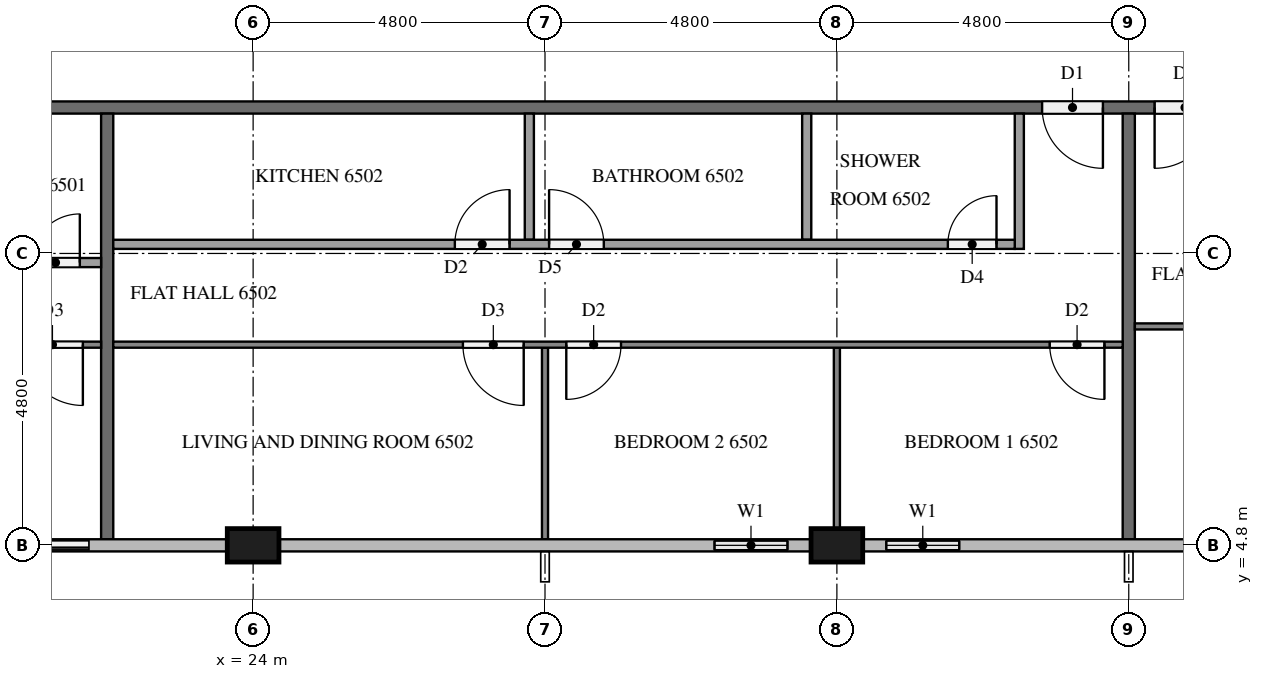
"""IFC4 building model, lengths in metres.
Left out: names, types, materials, properties, quantities, classifications, styles, units other than length and angle.
Written with IfcOpenShell. Run it as: python <this file> out.ifc"""

import sys

from ifc_helpers import new_model, si_unit, direction, frame, frame_2d, origin, origin_2d, place, context, subcontext, project, spatial, rectangle, extrude, element, fill, save


model = new_model("IFC4")
c1 = context("Model", 3, precision=1e-05, world=origin(), true_north=direction((0.0, 1.0)))
c2 = subcontext(c1, "Body", "Model", "MODEL_VIEW")
j1 = project(units=[si_unit("LENGTHUNIT", "METRE"), si_unit("PLANEANGLEUNIT", "RADIAN")], contexts=[c1])
p1 = place(None, origin())
s1 = spatial("IfcSite", under=j1, at=p1, CompositionType="ELEMENT")
p2 = place(p1, origin())
s2 = spatial("IfcBuilding", under=s1, at=p2, CompositionType="ELEMENT")
p3 = place(p2, frame((0.0, 0.0, 249.2)))
s3 = spatial("IfcBuildingStorey", under=s2, at=p3, CompositionType="ELEMENT", Elevation=249.2)
for number, where, z_axis, x_axis in (
    (1, (24.0, 4.8, 0.0), (0.0, 0.0, 1.0), (1.0, 0.0, 0.0)),
    (2, (33.6, 4.8, 0.0), (0.0, 0.0, 1.0), (1.0, 0.0, 0.0)),
):
    element("IfcColumn", number, at=place(p3, frame(where, z_axis=z_axis, x_axis=x_axis)), inside=s3, PredefinedType="COLUMN", context=c2, shape_type="SweptSolid", body=[
        extrude(rectangle(XDim=0.85, YDim=0.55, at=origin_2d()), origin(), (0.0, 0.0, 1.0), 3.2),
    ])
p4 = place(p3, frame((19.2, 4.8, 0.0), z_axis=(0.0, 0.0, 1.0), x_axis=(1.0, 0.0, 0.0)))
e3 = element("IfcWall", 3, at=p4, inside=s3, PredefinedType="SOLIDWALL", context=c2, shape_type="SweptSolid", body=[
    extrude(rectangle(XDim=2.4, YDim=0.15, at=frame_2d((1.2, 0.0))), origin(), (0.0, 0.0, 1.0), 3.2),
])
p5 = place(p4, frame((0.3, 0.0, 0.0)))
e4 = element("IfcOpeningElement", 4, at=p5, cuts=e3, PredefinedType="OPENING", context=c2, shape_type="SweptSolid", body=[
    extrude(rectangle(XDim=1.8, YDim=2.4, at=frame_2d((0.9, 1.2))), frame((0.0, 0.085, 0.0), z_axis=(0.0, -1.0, 0.0), x_axis=(1.0, 0.0, 0.0)), (0.0, 0.0, 1.0), 0.17),
])
p6 = place(p3, frame((31.2, 4.8, 0.0), z_axis=(0.0, 0.0, 1.0), x_axis=(1.0, 0.0, 0.0)))
e5 = element("IfcWall", 5, at=p6, inside=s3, PredefinedType="SOLIDWALL", context=c2, shape_type="SweptSolid", body=[
    extrude(rectangle(XDim=1.975, YDim=0.15, at=frame_2d((0.988, 0.0))), origin(), (0.0, 0.0, 1.0), 3.2),
])
p7 = place(p6, frame((0.387, 0.0, 0.9)))
e6 = element("IfcOpeningElement", 6, at=p7, cuts=e5, PredefinedType="OPENING", context=c2, shape_type="SweptSolid", body=[
    extrude(rectangle(XDim=1.2, YDim=1.4, at=frame_2d((0.6, 0.7))), frame((0.0, 0.085, 0.0), z_axis=(0.0, -1.0, 0.0), x_axis=(1.0, 0.0, 0.0)), (0.0, 0.0, 1.0), 0.17),
])
p8 = place(p3, frame((34.025, 4.8, 0.0), z_axis=(0.0, 0.0, 1.0), x_axis=(1.0, 0.0, 0.0)))
e7 = element("IfcWall", 7, at=p8, inside=s3, PredefinedType="SOLIDWALL", context=c2, shape_type="SweptSolid", body=[
    extrude(rectangle(XDim=1.975, YDim=0.15, at=frame_2d((0.988, 0.0))), origin(), (0.0, 0.0, 1.0), 3.2),
])
p9 = place(p8, frame((0.387, 0.0, 0.9)))
e8 = element("IfcOpeningElement", 8, at=p9, cuts=e7, PredefinedType="OPENING", context=c2, shape_type="SweptSolid", body=[
    extrude(rectangle(XDim=1.2, YDim=1.4, at=frame_2d((0.6, 0.7))), frame((0.0, 0.085, 0.0), z_axis=(0.0, -1.0, 0.0), x_axis=(1.0, 0.0, 0.0)), (0.0, 0.0, 1.0), 0.17),
])
p10 = place(p3, frame((50.5, 12.0, 0.0), z_axis=(0.0, 0.0, 1.0), x_axis=(-1.0, 0.0, 0.0)))
e9 = element("IfcWall", 9, at=p10, inside=s3, PredefinedType="PARTITIONING", context=c2, shape_type="SweptSolid", body=[
    extrude(rectangle(XDim=38.6, YDim=0.2, at=frame_2d((19.3, 0.0))), origin(), (0.0, 0.0, 1.0), 3.2),
])
p11 = place(p10, frame((37.075, 0.0, 0.0)))
e10 = element("IfcOpeningElement", 10, at=p11, cuts=e9, PredefinedType="OPENING", context=c2, shape_type="SweptSolid", body=[
    extrude(rectangle(XDim=1.0, YDim=2.1, at=frame_2d((0.5, 1.05))), frame((0.0, 0.11, 0.0), z_axis=(0.0, -1.0, 0.0), x_axis=(1.0, 0.0, 0.0)), (0.0, 0.0, 1.0), 0.22),
])
p12 = place(p10, frame((12.525, 0.0, 0.0)))
e11 = element("IfcOpeningElement", 11, at=p12, cuts=e9, PredefinedType="OPENING", context=c2, shape_type="SweptSolid", body=[
    extrude(rectangle(XDim=1.0, YDim=2.1, at=frame_2d((0.5, 1.05))), frame((0.0, 0.11, 0.0), z_axis=(0.0, -1.0, 0.0), x_axis=(1.0, 0.0, 0.0)), (0.0, 0.0, 1.0), 0.22),
])
p13 = place(p10, frame((10.675, 0.0, 0.0)))
e12 = element("IfcOpeningElement", 12, at=p13, cuts=e9, PredefinedType="OPENING", context=c2, shape_type="SweptSolid", body=[
    extrude(rectangle(XDim=1.0, YDim=2.1, at=frame_2d((0.5, 1.05))), frame((0.0, 0.11, 0.0), z_axis=(0.0, -1.0, 0.0), x_axis=(1.0, 0.0, 0.0)), (0.0, 0.0, 1.0), 0.22),
])
for number, where, z_axis, x_axis in (
    (13, (21.6, 11.9, 0.0), (0.0, 0.0, 1.0), (0.0, -1.0, 0.0)),
    (14, (38.4, 11.9, 0.0), (0.0, 0.0, 1.0), (0.0, -1.0, 0.0)),
):
    element("IfcWall", number, at=place(p3, frame(where, z_axis=z_axis, x_axis=x_axis)), inside=s3, PredefinedType="PARTITIONING", context=c2, shape_type="SweptSolid", body=[
        extrude(rectangle(XDim=7.0, YDim=0.2, at=frame_2d((3.5, 0.0))), origin(), (0.0, 0.0, 1.0), 3.2),
    ])
p14 = place(p3, frame((21.5, 8.1, 0.0), z_axis=(0.0, 0.0, 1.0), x_axis=(-1.0, 0.0, 0.0)))
e15 = element("IfcWall", 15, at=p14, inside=s3, PredefinedType="PARTITIONING", context=c2, shape_type="SweptSolid", body=[
    extrude(rectangle(XDim=9.4, YDim=0.1, at=frame_2d((4.7, 0.0))), origin(), (0.0, 0.0, 1.0), 3.2),
])
p15 = place(p14, frame((8.2, 0.0, 0.0)))
e16 = element("IfcOpeningElement", 16, at=p15, cuts=e15, PredefinedType="OPENING", context=c2, shape_type="SweptSolid", body=[
    extrude(rectangle(XDim=0.9, YDim=2.1, at=frame_2d((0.45, 1.05))), frame((0.0, 0.06, 0.0), z_axis=(0.0, -1.0, 0.0), x_axis=(1.0, 0.0, 0.0)), (0.0, 0.0, 1.0), 0.12),
])
p16 = place(p14, frame((0.3, 0.0, 0.0)))
e17 = element("IfcOpeningElement", 17, at=p16, cuts=e15, PredefinedType="OPENING", context=c2, shape_type="SweptSolid", body=[
    extrude(rectangle(XDim=1.0, YDim=2.1, at=frame_2d((0.5, 1.05))), frame((0.0, 0.06, 0.0), z_axis=(0.0, -1.0, 0.0), x_axis=(1.0, 0.0, 0.0)), (0.0, 0.0, 1.0), 0.12),
])
p17 = place(p3, frame((13.875, 9.45, 0.0), z_axis=(0.0, 0.0, 1.0), x_axis=(1.0, 0.0, 0.0)))
e18 = element("IfcWall", 18, at=p17, inside=s3, PredefinedType="PARTITIONING", context=c2, shape_type="SweptSolid", body=[
    extrude(rectangle(XDim=7.625, YDim=0.15, at=frame_2d((3.812, 0.0))), origin(), (0.0, 0.0, 1.0), 3.2),
])
p18 = place(p17, frame((0.3, 0.0, 0.0)))
e19 = element("IfcOpeningElement", 19, at=p18, cuts=e18, PredefinedType="OPENING", context=c2, shape_type="SweptSolid", body=[
    extrude(rectangle(XDim=0.9, YDim=2.1, at=frame_2d((0.45, 1.05))), frame((0.0, 0.085, 0.0), z_axis=(0.0, -1.0, 0.0), x_axis=(1.0, 0.0, 0.0)), (0.0, 0.0, 1.0), 0.17),
])
p19 = place(p17, frame((6.475, 0.0, 0.0)))
e20 = element("IfcOpeningElement", 20, at=p19, cuts=e18, PredefinedType="OPENING", context=c2, shape_type="SweptSolid", body=[
    extrude(rectangle(XDim=0.8, YDim=2.1, at=frame_2d((0.4, 1.05))), frame((0.0, 0.085, 0.0), z_axis=(0.0, -1.0, 0.0), x_axis=(1.0, 0.0, 0.0)), (0.0, 0.0, 1.0), 0.17),
])
p20 = place(p3, frame((33.6, 8.05, 0.0), z_axis=(0.0, 0.0, 1.0), x_axis=(0.0, -1.0, 0.0)))
e21 = element("IfcWall", 21, at=p20, inside=s3, PredefinedType="PARTITIONING", context=c2, shape_type="SweptSolid", body=[
    extrude(rectangle(XDim=2.975, YDim=0.1, at=frame_2d((1.488, 0.0))), origin(), (0.0, 0.0, 1.0), 3.2),
])
p21 = place(p3, frame((28.8, 8.05, 0.0), z_axis=(0.0, 0.0, 1.0), x_axis=(0.0, -1.0, 0.0)))
e22 = element("IfcWall", 22, at=p21, inside=s3, PredefinedType="PARTITIONING", context=c2, shape_type="SweptSolid", body=[
    extrude(rectangle(XDim=3.15, YDim=0.1, at=frame_2d((1.575, 0.0))), origin(), (0.0, 0.0, 1.0), 3.2),
])
p22 = place(p3, frame((38.3, 8.1, 0.0), z_axis=(0.0, 0.0, 1.0), x_axis=(-1.0, 0.0, 0.0)))
e23 = element("IfcWall", 23, at=p22, inside=s3, PredefinedType="PARTITIONING", context=c2, shape_type="SweptSolid", body=[
    extrude(rectangle(XDim=16.6, YDim=0.1, at=frame_2d((8.3, 0.0))), origin(), (0.0, 0.0, 1.0), 3.2),
])
p23 = place(p22, frame((0.3, 0.0, 0.0)))
e24 = element("IfcOpeningElement", 24, at=p23, cuts=e23, PredefinedType="OPENING", context=c2, shape_type="SweptSolid", body=[
    extrude(rectangle(XDim=0.9, YDim=2.1, at=frame_2d((0.45, 1.05))), frame((0.0, 0.06, 0.0), z_axis=(0.0, -1.0, 0.0), x_axis=(1.0, 0.0, 0.0)), (0.0, 0.0, 1.0), 0.12),
])
p24 = place(p22, frame((8.25, 0.0, 0.0)))
e25 = element("IfcOpeningElement", 25, at=p24, cuts=e23, PredefinedType="OPENING", context=c2, shape_type="SweptSolid", body=[
    extrude(rectangle(XDim=0.9, YDim=2.1, at=frame_2d((0.45, 1.05))), frame((0.0, 0.06, 0.0), z_axis=(0.0, -1.0, 0.0), x_axis=(1.0, 0.0, 0.0)), (0.0, 0.0, 1.0), 0.12),
])
p25 = place(p22, frame((9.85, 0.0, 0.0)))
e26 = element("IfcOpeningElement", 26, at=p25, cuts=e23, PredefinedType="OPENING", context=c2, shape_type="SweptSolid", body=[
    extrude(rectangle(XDim=1.0, YDim=2.1, at=frame_2d((0.5, 1.05))), frame((0.0, 0.06, 0.0), z_axis=(0.0, -1.0, 0.0), x_axis=(1.0, 0.0, 0.0)), (0.0, 0.0, 1.0), 0.12),
])
for number, where, z_axis, x_axis in (
    (27, (33.104, 11.9, 0.0), (0.0, 0.0, 1.0), (0.0, -1.0, 0.0)),
    (28, (28.542, 11.9, 0.0), (0.0, 0.0, 1.0), (0.0, -1.0, 0.0)),
):
    element("IfcWall", number, at=place(p3, frame(where, z_axis=z_axis, x_axis=x_axis)), inside=s3, PredefinedType="PARTITIONING", context=c2, shape_type="SweptSolid", body=[
        extrude(rectangle(XDim=2.075, YDim=0.15, at=frame_2d((1.038, 0.0))), origin(), (0.0, 0.0, 1.0), 3.2),
    ])
p26 = place(p3, frame((36.6, 11.9, 0.0), z_axis=(0.0, 0.0, 1.0), x_axis=(0.0, -1.0, 0.0)))
e29 = element("IfcWall", 29, at=p26, inside=s3, PredefinedType="PARTITIONING", context=c2, shape_type="SweptSolid", body=[
    extrude(rectangle(XDim=2.225, YDim=0.15, at=frame_2d((1.112, 0.0))), origin(), (0.0, 0.0, 1.0), 3.2),
])
p27 = place(p3, frame((21.7, 9.75, 0.0), z_axis=(0.0, 0.0, 1.0), x_axis=(1.0, 0.0, 0.0)))
e30 = element("IfcWall", 30, at=p27, inside=s3, PredefinedType="PARTITIONING", context=c2, shape_type="SweptSolid", body=[
    extrude(rectangle(XDim=14.825, YDim=0.15, at=frame_2d((7.413, 0.0))), origin(), (0.0, 0.0, 1.0), 3.2),
])
p28 = place(p27, frame((13.725, 0.0, 0.0)))
e31 = element("IfcOpeningElement", 31, at=p28, cuts=e30, PredefinedType="OPENING", context=c2, shape_type="SweptSolid", body=[
    extrude(rectangle(XDim=0.8, YDim=2.1, at=frame_2d((0.4, 1.05))), frame((0.0, 0.085, 0.0), z_axis=(0.0, -1.0, 0.0), x_axis=(1.0, 0.0, 0.0)), (0.0, 0.0, 1.0), 0.17),
])
p29 = place(p27, frame((7.167, 0.0, 0.0)))
e32 = element("IfcOpeningElement", 32, at=p29, cuts=e30, PredefinedType="OPENING", context=c2, shape_type="SweptSolid", body=[
    extrude(rectangle(XDim=0.9, YDim=2.1, at=frame_2d((0.45, 1.05))), frame((0.0, 0.085, 0.0), z_axis=(0.0, -1.0, 0.0), x_axis=(1.0, 0.0, 0.0)), (0.0, 0.0, 1.0), 0.17),
])
p30 = place(p27, frame((5.617, 0.0, 0.0)))
e33 = element("IfcOpeningElement", 33, at=p30, cuts=e30, PredefinedType="OPENING", context=c2, shape_type="SweptSolid", body=[
    extrude(rectangle(XDim=0.9, YDim=2.1, at=frame_2d((0.45, 1.05))), frame((0.0, 0.085, 0.0), z_axis=(0.0, -1.0, 0.0), x_axis=(1.0, 0.0, 0.0)), (0.0, 0.0, 1.0), 0.17),
])
p31 = place(p3, frame((50.3, 8.4, 0.0), z_axis=(0.0, 0.0, 1.0), x_axis=(-1.0, 0.0, 0.0)))
e34 = element("IfcWall", 34, at=p31, inside=s3, PredefinedType="PARTITIONING", context=c2, shape_type="SweptSolid", body=[
    extrude(rectangle(XDim=11.8, YDim=0.1, at=frame_2d((5.9, 0.0))), origin(), (0.0, 0.0, 1.0), 3.2),
])
p32 = place(p31, frame((7.45, 0.0, 0.0)))
e35 = element("IfcOpeningElement", 35, at=p32, cuts=e34, PredefinedType="OPENING", context=c2, shape_type="SweptSolid", body=[
    extrude(rectangle(XDim=0.9, YDim=2.1, at=frame_2d((0.45, 1.05))), frame((0.0, 0.06, 0.0), z_axis=(0.0, -1.0, 0.0), x_axis=(1.0, 0.0, 0.0)), (0.0, 0.0, 1.0), 0.12),
])
p33 = place(p31, frame((5.75, 0.0, 0.0)))
e36 = element("IfcOpeningElement", 36, at=p33, cuts=e34, PredefinedType="OPENING", context=c2, shape_type="SweptSolid", body=[
    extrude(rectangle(XDim=1.0, YDim=2.1, at=frame_2d((0.5, 1.05))), frame((0.0, 0.06, 0.0), z_axis=(0.0, -1.0, 0.0), x_axis=(1.0, 0.0, 0.0)), (0.0, 0.0, 1.0), 0.12),
])
p34 = place(p5, origin())
e37 = element("IfcDoor", 37, at=p34, inside=s3, OperationType="SLIDING_TO_LEFT", PredefinedType="DOOR", context=c2, shape_type="SweptSolid", body=[
    extrude(rectangle(XDim=1.8, YDim=2.4, at=frame_2d((0.9, 1.2))), frame((0.0, 0.025, 0.0), z_axis=(0.0, -1.0, 0.0), x_axis=(1.0, 0.0, 0.0)), (0.0, 0.0, 1.0), 0.05),
])
fill(e4, e37)
p35 = place(p7, origin())
e38 = element("IfcWindow", 38, at=p35, inside=s3, PartitioningType="SINGLE_PANEL", PredefinedType="WINDOW", context=c2, shape_type="SweptSolid", body=[
    extrude(rectangle(XDim=1.2, YDim=1.4, at=frame_2d((0.6, 0.7))), frame((0.0, 0.03, 0.0), z_axis=(0.0, -1.0, 0.0), x_axis=(1.0, 0.0, 0.0)), (0.0, 0.0, 1.0), 0.06),
])
fill(e6, e38)
p36 = place(p9, origin())
e39 = element("IfcWindow", 39, at=p36, inside=s3, PartitioningType="SINGLE_PANEL", PredefinedType="WINDOW", context=c2, shape_type="SweptSolid", body=[
    extrude(rectangle(XDim=1.2, YDim=1.4, at=frame_2d((0.6, 0.7))), frame((0.0, 0.03, 0.0), z_axis=(0.0, -1.0, 0.0), x_axis=(1.0, 0.0, 0.0)), (0.0, 0.0, 1.0), 0.06),
])
fill(e8, e39)
p37 = place(p12, origin())
e40 = element("IfcDoor", 40, at=p37, inside=s3, OperationType="SINGLE_SWING_LEFT", PredefinedType="DOOR", context=c2, shape_type="SweptSolid", body=[
    extrude(rectangle(XDim=1.0, YDim=2.1, at=frame_2d((0.5, 1.05))), frame((0.0, 0.025, 0.0), z_axis=(0.0, -1.0, 0.0), x_axis=(1.0, 0.0, 0.0)), (0.0, 0.0, 1.0), 0.05),
])
fill(e11, e40)
p38 = place(p13, origin())
e41 = element("IfcDoor", 41, at=p38, inside=s3, OperationType="SINGLE_SWING_RIGHT", PredefinedType="DOOR", context=c2, shape_type="SweptSolid", body=[
    extrude(rectangle(XDim=1.0, YDim=2.1, at=frame_2d((0.5, 1.05))), frame((0.0, 0.025, 0.0), z_axis=(0.0, -1.0, 0.0), x_axis=(1.0, 0.0, 0.0)), (0.0, 0.0, 1.0), 0.05),
])
fill(e12, e41)
p39 = place(p16, origin())
e42 = element("IfcDoor", 42, at=p39, inside=s3, OperationType="SINGLE_SWING_LEFT", PredefinedType="DOOR", context=c2, shape_type="SweptSolid", body=[
    extrude(rectangle(XDim=1.0, YDim=2.1, at=frame_2d((0.5, 1.05))), frame((0.0, 0.025, 0.0), z_axis=(0.0, -1.0, 0.0), x_axis=(1.0, 0.0, 0.0)), (0.0, 0.0, 1.0), 0.05),
])
fill(e17, e42)
p40 = place(p19, origin())
e43 = element("IfcDoor", 43, at=p40, inside=s3, OperationType="SINGLE_SWING_RIGHT", PredefinedType="DOOR", context=c2, shape_type="SweptSolid", body=[
    extrude(rectangle(XDim=0.8, YDim=2.1, at=frame_2d((0.4, 1.05))), frame((0.0, 0.025, 0.0), z_axis=(0.0, -1.0, 0.0), x_axis=(1.0, 0.0, 0.0)), (0.0, 0.0, 1.0), 0.05),
])
fill(e20, e43)
p41 = place(p23, origin())
e44 = element("IfcDoor", 44, at=p41, inside=s3, OperationType="SINGLE_SWING_LEFT", PredefinedType="DOOR", context=c2, shape_type="SweptSolid", body=[
    extrude(rectangle(XDim=0.9, YDim=2.1, at=frame_2d((0.45, 1.05))), frame((0.0, 0.025, 0.0), z_axis=(0.0, -1.0, 0.0), x_axis=(1.0, 0.0, 0.0)), (0.0, 0.0, 1.0), 0.05),
])
fill(e24, e44)
p42 = place(p24, origin())
e45 = element("IfcDoor", 45, at=p42, inside=s3, OperationType="SINGLE_SWING_RIGHT", PredefinedType="DOOR", context=c2, shape_type="SweptSolid", body=[
    extrude(rectangle(XDim=0.9, YDim=2.1, at=frame_2d((0.45, 1.05))), frame((0.0, 0.025, 0.0), z_axis=(0.0, -1.0, 0.0), x_axis=(1.0, 0.0, 0.0)), (0.0, 0.0, 1.0), 0.05),
])
fill(e25, e45)
p43 = place(p25, origin())
e46 = element("IfcDoor", 46, at=p43, inside=s3, OperationType="SINGLE_SWING_LEFT", PredefinedType="DOOR", context=c2, shape_type="SweptSolid", body=[
    extrude(rectangle(XDim=1.0, YDim=2.1, at=frame_2d((0.5, 1.05))), frame((0.0, 0.025, 0.0), z_axis=(0.0, -1.0, 0.0), x_axis=(1.0, 0.0, 0.0)), (0.0, 0.0, 1.0), 0.05),
])
fill(e26, e46)
p44 = place(p28, origin())
e47 = element("IfcDoor", 47, at=p44, inside=s3, OperationType="SINGLE_SWING_RIGHT", PredefinedType="DOOR", context=c2, shape_type="SweptSolid", body=[
    extrude(rectangle(XDim=0.8, YDim=2.1, at=frame_2d((0.4, 1.05))), frame((0.0, 0.025, 0.0), z_axis=(0.0, -1.0, 0.0), x_axis=(1.0, 0.0, 0.0)), (0.0, 0.0, 1.0), 0.05),
])
fill(e31, e47)
p45 = place(p29, origin())
e48 = element("IfcDoor", 48, at=p45, inside=s3, OperationType="SINGLE_SWING_LEFT", PredefinedType="DOOR", context=c2, shape_type="SweptSolid", body=[
    extrude(rectangle(XDim=0.9, YDim=2.1, at=frame_2d((0.45, 1.05))), frame((0.0, 0.025, 0.0), z_axis=(0.0, -1.0, 0.0), x_axis=(1.0, 0.0, 0.0)), (0.0, 0.0, 1.0), 0.05),
])
fill(e32, e48)
p46 = place(p30, origin())
e49 = element("IfcDoor", 49, at=p46, inside=s3, OperationType="SINGLE_SWING_RIGHT", PredefinedType="DOOR", context=c2, shape_type="SweptSolid", body=[
    extrude(rectangle(XDim=0.9, YDim=2.1, at=frame_2d((0.45, 1.05))), frame((0.0, 0.025, 0.0), z_axis=(0.0, -1.0, 0.0), x_axis=(1.0, 0.0, 0.0)), (0.0, 0.0, 1.0), 0.05),
])
fill(e33, e49)
save(model, sys.argv[1])
